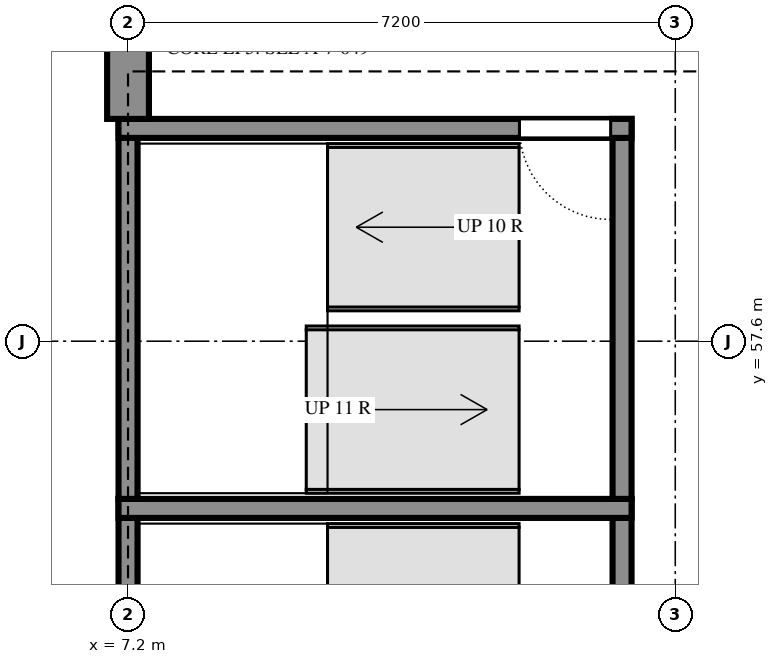
"""IFC4 building model, lengths in metres.
Left out: names, types, materials, properties, quantities, classifications, styles, units other than length and angle.
Written with IfcOpenShell. Run it as: python <this file> out.ifc"""

import sys

from ifc_helpers import new_model, si_unit, direction, frame, frame_2d, origin, place, context, subcontext, project, spatial, rectangle, extrude, element, fill, save


model = new_model("IFC4")
c1 = context("Model", 3, precision=1e-05, world=origin(), true_north=direction((0.0, 1.0)))
c2 = subcontext(c1, "Body", "Model", "MODEL_VIEW")
j1 = project(units=[si_unit("LENGTHUNIT", "METRE"), si_unit("PLANEANGLEUNIT", "RADIAN")], contexts=[c1])
p1 = place(None, origin())
s1 = spatial("IfcSite", under=j1, at=p1, CompositionType="ELEMENT")
p2 = place(p1, origin())
s2 = spatial("IfcBuilding", under=s1, at=p2, CompositionType="ELEMENT")
p3 = place(p2, frame((0.0, 0.0, 3.6)))
s3 = spatial("IfcBuildingStorey", under=s2, at=p3, CompositionType="ELEMENT", Elevation=3.6)
p4 = place(p3, frame((13.7, 50.275, 0.0), z_axis=(0.0, 0.0, 1.0), x_axis=(0.0, 1.0, 0.0)))
e1 = element("IfcWall", 1, at=p4, inside=s3, PredefinedType="SHEAR", context=c2, shape_type="SweptSolid", body=[
    extrude(rectangle(XDim=5.25, YDim=0.25, at=frame_2d((2.625, 0.0))), origin(), (0.0, 0.0, 1.0), 3.6),
])
p5 = place(p4, frame((1.975, 0.0, 0.0)))
e2 = element("IfcOpeningElement", 2, at=p5, cuts=e1, PredefinedType="OPENING", context=c2, shape_type="SweptSolid", body=[
    extrude(rectangle(XDim=1.2, YDim=2.4, at=frame_2d((0.6, 1.2))), frame((0.0, 0.135, 0.0), z_axis=(0.0, -1.0, 0.0), x_axis=(1.0, 0.0, 0.0)), (0.0, 0.0, 1.0), 0.27),
])
p6 = place(p3, frame((7.2, 55.525, 0.0), z_axis=(0.0, 0.0, 1.0), x_axis=(0.0, -1.0, 0.0)))
e3 = element("IfcWall", 3, at=p6, inside=s3, PredefinedType="SHEAR", context=c2, shape_type="SweptSolid", body=[
    extrude(rectangle(XDim=5.0, YDim=0.25, at=frame_2d((2.5, 0.0))), origin(), (0.0, 0.0, 1.0), 3.6),
])
p7 = place(p3, frame((13.825, 55.4, 0.0), z_axis=(0.0, 0.0, 1.0), x_axis=(-1.0, 0.0, 0.0)))
e4 = element("IfcWall", 4, at=p7, inside=s3, PredefinedType="SHEAR", context=c2, shape_type="SweptSolid", body=[
    extrude(rectangle(XDim=6.75, YDim=0.25, at=frame_2d((3.375, 0.0))), origin(), (0.0, 0.0, 1.0), 3.6),
])
for number, where, z_axis, x_axis in (
    (5, (13.7, 55.525, 0.0), (0.0, 0.0, 1.0), (0.0, 1.0, 0.0)),
    (6, (7.2, 60.525, 0.0), (0.0, 0.0, 1.0), (0.0, -1.0, 0.0)),
):
    element("IfcWall", number, at=place(p3, frame(where, z_axis=z_axis, x_axis=x_axis)), inside=s3, PredefinedType="SHEAR", context=c2, shape_type="SweptSolid", body=[
        extrude(rectangle(XDim=5.0, YDim=0.25, at=frame_2d((2.5, 0.0))), origin(), (0.0, 0.0, 1.0), 3.6),
    ])
p8 = place(p3, frame((13.825, 60.4, 0.0), z_axis=(0.0, 0.0, 1.0), x_axis=(-1.0, 0.0, 0.0)))
e7 = element("IfcWall", 7, at=p8, inside=s3, PredefinedType="SHEAR", context=c2, shape_type="SweptSolid", body=[
    extrude(rectangle(XDim=6.75, YDim=0.25, at=frame_2d((3.375, 0.0))), origin(), (0.0, 0.0, 1.0), 3.6),
])
p9 = place(p8, frame((0.275, 0.0, 0.0)))
e8 = element("IfcOpeningElement", 8, at=p9, cuts=e7, PredefinedType="OPENING", context=c2, shape_type="SweptSolid", body=[
    extrude(rectangle(XDim=1.2, YDim=2.4, at=frame_2d((0.6, 1.2))), frame((0.0, 0.135, 0.0), z_axis=(0.0, -1.0, 0.0), x_axis=(1.0, 0.0, 0.0)), (0.0, 0.0, 1.0), 0.27),
])
p10 = place(p3, frame((7.2, 60.525, 0.0), z_axis=(0.0, 0.0, 1.0), x_axis=(0.0, 1.0, 0.0)))
e9 = element("IfcWall", 9, at=p10, inside=s3, PredefinedType="SOLIDWALL", context=c2, shape_type="SweptSolid", body=[
    extrude(rectangle(XDim=55.25, YDim=0.55, at=frame_2d((27.625, 0.0))), origin(), (0.0, 0.0, 1.0), 3.6),
])
p11 = place(p9, origin())
e10 = element("IfcDoor", 10, at=p11, inside=s3, OperationType="SINGLE_SWING_RIGHT", PredefinedType="DOOR", context=c2, shape_type="SweptSolid", body=[
    extrude(rectangle(XDim=1.2, YDim=2.4, at=frame_2d((0.6, 1.2))), frame((0.0, 0.025, 0.0), z_axis=(0.0, -1.0, 0.0), x_axis=(1.0, 0.0, 0.0)), (0.0, 0.0, 1.0), 0.05),
])
fill(e8, e10)
save(model, sys.argv[1])
